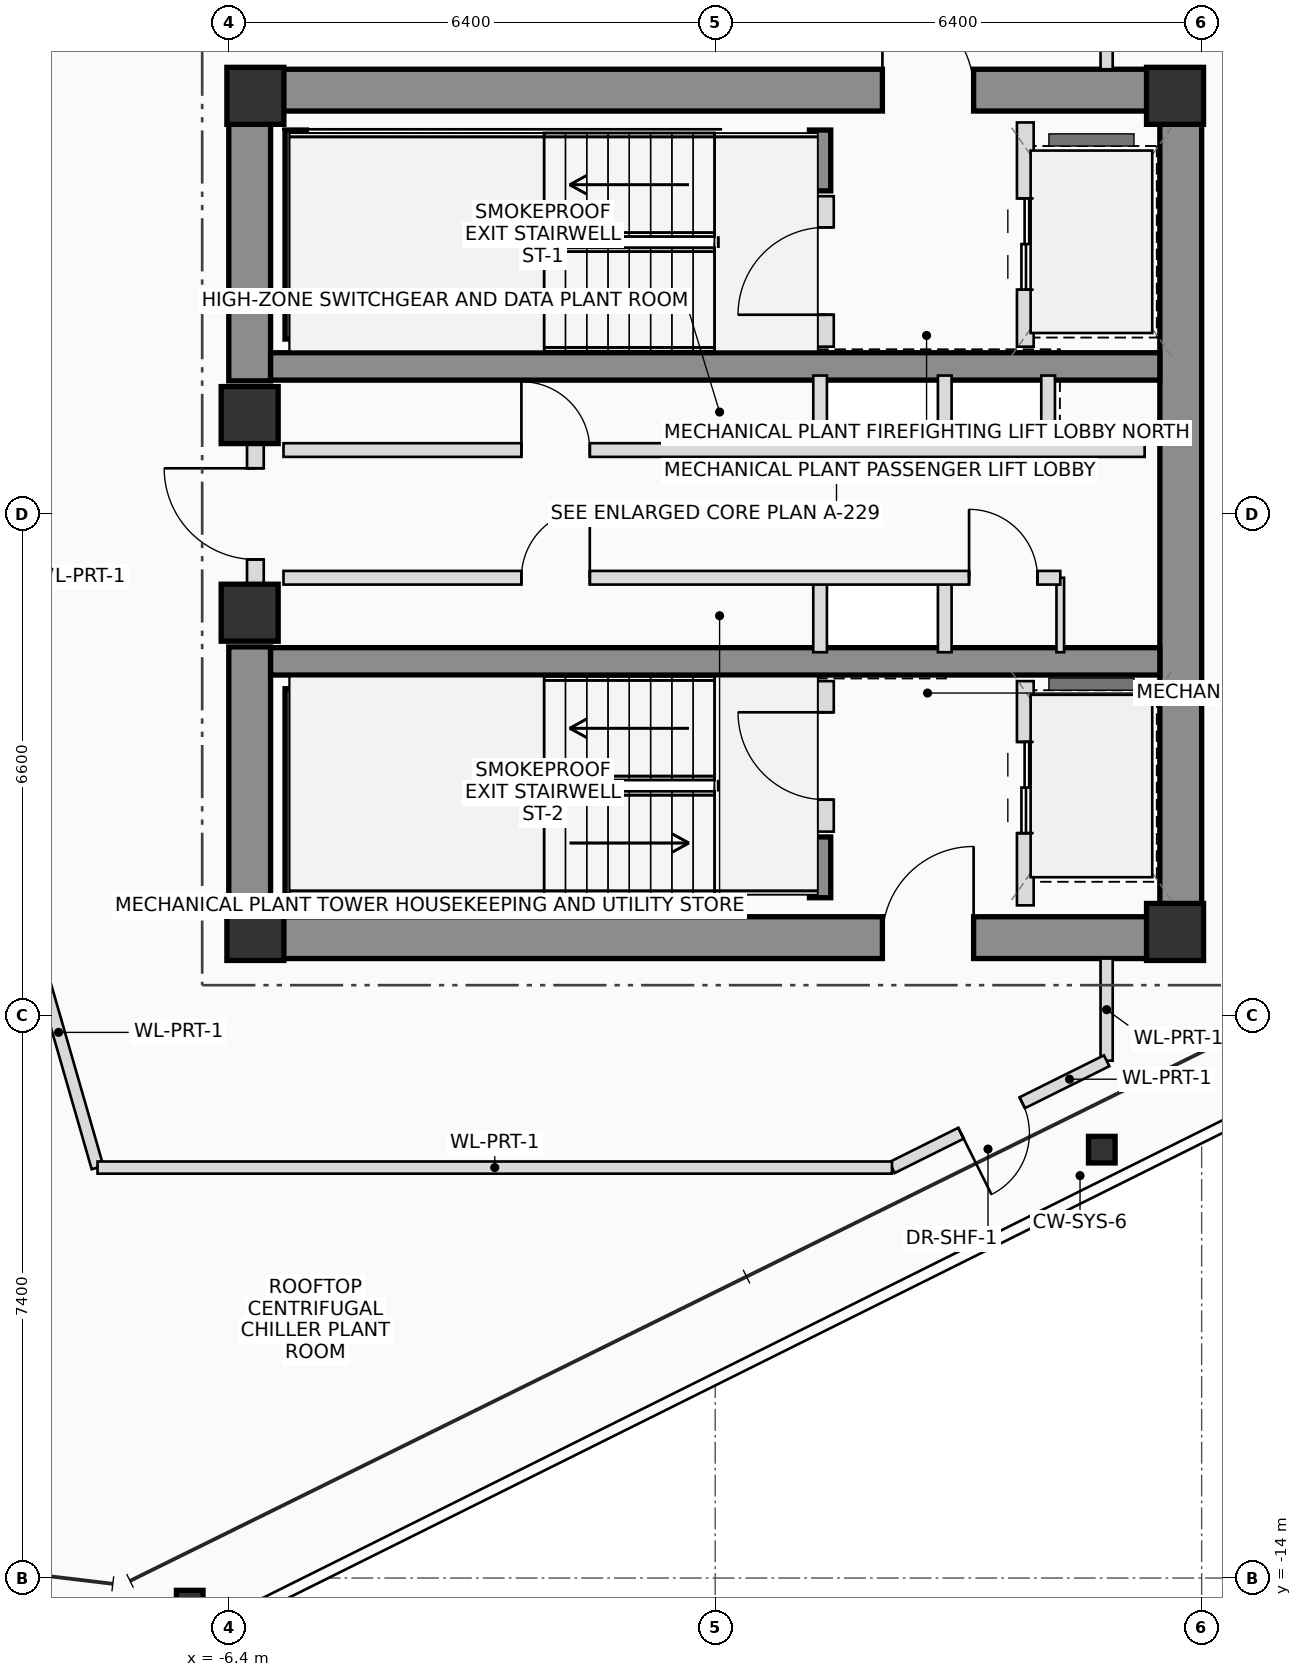
"""IFC4 building model, lengths in metres.
Left out: names, types, materials, properties, quantities, classifications, styles, units other than length and angle.
Written with IfcOpenShell. Run it as: python <this file> out.ifc"""

import sys

from ifc_helpers import new_model, si_unit, direction, frame, frame_2d, origin, origin_2d, place, context, subcontext, project, spatial, rectangle, i_section, extrude, source, transform, mapped, element, fill, save


model = new_model("IFC4")
c1 = context("Model", 3, precision=1e-05, world=origin(), true_north=direction((0.0, 1.0)))
c2 = subcontext(c1, "Body", "Model", "MODEL_VIEW")
j1 = project(units=[si_unit("LENGTHUNIT", "METRE"), si_unit("PLANEANGLEUNIT", "RADIAN")], contexts=[c1])
p1 = place(None, origin())
s1 = spatial("IfcSite", under=j1, at=p1, CompositionType="ELEMENT")
p2 = place(p1, origin())
s2 = spatial("IfcBuilding", under=s1, at=p2, CompositionType="ELEMENT")
p3 = place(p2, frame((0.0, 0.0, 317.45)))
s3 = spatial("IfcBuildingStorey", under=s2, at=p3, CompositionType="ELEMENT", Elevation=317.45)
m1 = source(origin(), c2, "Body", "SweptSolid", [
    extrude(rectangle(XDim=0.75, YDim=0.75, at=origin_2d()), origin(), (0.0, 0.0, 1.0), 5.4),
])
for number, where, z_axis, x_axis in (
    (1, (-6.05, -5.5, 0.0), (0.0, 0.0, 1.0), (1.0, 0.0, 0.0)),
    (2, (6.05, -5.5, 0.0), (0.0, 0.0, 1.0), (1.0, 0.0, 0.0)),
    (3, (6.05, 5.5, 0.0), (0.0, 0.0, 1.0), (1.0, 0.0, 0.0)),
    (4, (-6.05, 5.5, 0.0), (0.0, 0.0, 1.0), (1.0, 0.0, 0.0)),
):
    element("IfcColumn", number, at=place(p3, frame(where, z_axis=z_axis, x_axis=x_axis)), inside=s3, PredefinedType="COLUMN", context=c2, shape_type="MappedRepresentation", body=[
        mapped(m1, transform((0.0, 0.0, 0.0), scale=1.0)),
    ])
p4 = place(p3, frame((-6.4, 5.575, 0.0), z_axis=(0.0, 0.0, 1.0), x_axis=(1.0, 0.0, 0.0)))
e5 = element("IfcWall", 5, at=p4, inside=s3, PredefinedType="SHEAR", context=c2, shape_type="SweptSolid", body=[
    extrude(rectangle(XDim=12.8, YDim=0.55, at=frame_2d((6.4, 0.0))), origin(), (0.0, 0.0, 1.0), 5.4),
])
p5 = place(p4, frame((8.6, 0.0, 0.0)))
e6 = element("IfcOpeningElement", 6, at=p5, cuts=e5, PredefinedType="OPENING", context=c2, shape_type="SweptSolid", body=[
    extrude(rectangle(XDim=1.2, YDim=2.2, at=frame_2d((0.6, 1.1))), frame((0.0, 0.285, 0.0), z_axis=(0.0, -1.0, 0.0), x_axis=(1.0, 0.0, 0.0)), (0.0, 0.0, 1.0), 0.57),
])
p6 = place(p3, frame((-6.4, -5.575, 0.0), z_axis=(0.0, 0.0, 1.0), x_axis=(1.0, 0.0, 0.0)))
e7 = element("IfcWall", 7, at=p6, inside=s3, PredefinedType="SHEAR", context=c2, shape_type="SweptSolid", body=[
    extrude(rectangle(XDim=12.8, YDim=0.55, at=frame_2d((6.4, 0.0))), origin(), (0.0, 0.0, 1.0), 5.4),
])
p7 = place(p6, frame((8.6, 0.0, 0.0)))
e8 = element("IfcOpeningElement", 8, at=p7, cuts=e7, PredefinedType="OPENING", context=c2, shape_type="SweptSolid", body=[
    extrude(rectangle(XDim=1.2, YDim=2.2, at=frame_2d((0.6, 1.1))), frame((0.0, 0.285, 0.0), z_axis=(0.0, -1.0, 0.0), x_axis=(1.0, 0.0, 0.0)), (0.0, 0.0, 1.0), 0.57),
])
p8 = place(p3, frame((6.125, -5.3, 0.0), z_axis=(0.0, 0.0, 1.0), x_axis=(0.0, 1.0, 0.0)))
e9 = element("IfcWall", 9, at=p8, inside=s3, PredefinedType="SHEAR", context=c2, shape_type="SweptSolid", body=[
    extrude(rectangle(XDim=10.6, YDim=0.55, at=frame_2d((5.3, 0.0))), origin(), (0.0, 0.0, 1.0), 5.4),
])
for number, where, z_axis, x_axis in (
    (10, (-6.125, -5.3, 0.0), (0.0, 0.0, 1.0), (0.0, 1.0, 0.0)),
    (11, (-6.125, 1.75, 0.0), (0.0, 0.0, 1.0), (0.0, 1.0, 0.0)),
):
    element("IfcWall", number, at=place(p3, frame(where, z_axis=z_axis, x_axis=x_axis)), inside=s3, PredefinedType="SHEAR", context=c2, shape_type="SweptSolid", body=[
        extrude(rectangle(XDim=3.55, YDim=0.55, at=frame_2d((1.775, 0.0))), origin(), (0.0, 0.0, 1.0), 5.4),
    ])
for number, where, z_axis, x_axis in (
    (12, (-5.85, 1.94, 0.0), (0.0, 0.0, 1.0), (1.0, 0.0, 0.0)),
    (13, (-5.85, -1.94, 0.0), (0.0, 0.0, 1.0), (1.0, 0.0, 0.0)),
):
    element("IfcWall", number, at=place(p3, frame(where, z_axis=z_axis, x_axis=x_axis)), inside=s3, PredefinedType="SHEAR", context=c2, shape_type="SweptSolid", body=[
        extrude(rectangle(XDim=11.7, YDim=0.36, at=frame_2d((5.85, 0.0))), origin(), (0.0, 0.0, 1.0), 5.4),
    ])
p9 = place(p3, frame((-5.52, 2.3, 0.0), z_axis=(0.0, 0.0, 1.0), x_axis=(0.0, 1.0, 0.0)))
e14 = element("IfcWall", 14, at=p9, inside=s3, PredefinedType="SHEAR", context=c2, shape_type="SweptSolid", body=[
    extrude(rectangle(XDim=2.75, YDim=0.28, at=frame_2d((1.375, 0.0))), origin(), (0.0, 0.0, 1.0), 5.4),
])
p10 = place(p3, frame((1.38, 4.25, 0.0), z_axis=(0.0, 0.0, 1.0), x_axis=(0.0, 1.0, 0.0)))
e15 = element("IfcWall", 15, at=p10, inside=s3, PredefinedType="SHEAR", context=c2, shape_type="SweptSolid", body=[
    extrude(rectangle(XDim=0.8, YDim=0.28, at=frame_2d((0.4, 0.0))), origin(), (0.0, 0.0, 1.0), 5.4),
])
p11 = place(p3, frame((-5.52, -5.05, 0.0), z_axis=(0.0, 0.0, 1.0), x_axis=(0.0, 1.0, 0.0)))
e16 = element("IfcWall", 16, at=p11, inside=s3, PredefinedType="SHEAR", context=c2, shape_type="SweptSolid", body=[
    extrude(rectangle(XDim=2.75, YDim=0.28, at=frame_2d((1.375, 0.0))), origin(), (0.0, 0.0, 1.0), 5.4),
])
p12 = place(p3, frame((1.38, -5.05, 0.0), z_axis=(0.0, 0.0, 1.0), x_axis=(0.0, 1.0, 0.0)))
e17 = element("IfcWall", 17, at=p12, inside=s3, PredefinedType="SHEAR", context=c2, shape_type="SweptSolid", body=[
    extrude(rectangle(XDim=0.8, YDim=0.28, at=frame_2d((0.4, 0.0))), origin(), (0.0, 0.0, 1.0), 5.4),
])
for number, where, z_axis, x_axis in (
    (18, (-6.125, -1.3, 0.0), (0.0, 0.0, 1.0), (1.0, 0.0, 0.0)),
    (19, (-6.125, 1.3, 0.0), (0.0, 0.0, 1.0), (1.0, 0.0, 0.0)),
):
    element("IfcColumn", number, at=place(p3, frame(where, z_axis=z_axis, x_axis=x_axis)), inside=s3, PredefinedType="COLUMN", context=c2, shape_type="MappedRepresentation", body=[
        mapped(m1, transform((0.0, 0.0, 0.0), scale=1.0)),
    ])
m2 = source(origin(), c2, "Body", "SweptSolid", [
    extrude(i_section(OverallWidth=0.35, OverallDepth=0.35, WebThickness=0.012, FlangeThickness=0.019, FilletRadius=0.016, at=origin_2d()), origin(), (0.0, 0.0, 1.0), 5.4),
])
for number, where, z_axis, x_axis in (
    (20, (-6.914, -14.337, 0.0), (0.0, 0.0, 1.0), (1.0, 0.0, 0.0)),
    (21, (5.086, -8.364, 0.0), (0.0, 0.0, 1.0), (1.0, 0.0, 0.0)),
):
    element("IfcColumn", number, at=place(p3, frame(where, z_axis=z_axis, x_axis=x_axis)), inside=s3, PredefinedType="COLUMN", context=c2, shape_type="MappedRepresentation", body=[
        mapped(m2, transform((0.0, 0.0, 0.0), scale=1.0)),
    ])
p13 = place(p3, frame((-6.05, -0.95, 0.0), z_axis=(0.0, 0.0, 1.0), x_axis=(0.0, 1.0, 0.0)))
e22 = element("IfcWall", 22, at=p13, inside=s3, PredefinedType="PLUMBINGWALL", context=c2, shape_type="SweptSolid", body=[
    extrude(rectangle(XDim=1.9, YDim=0.22, at=frame_2d((0.95, 0.0))), origin(), (0.0, 0.0, 1.0), 4.1),
])
p14 = place(p13, frame((0.35, 0.0, 0.0)))
e23 = element("IfcOpeningElement", 23, at=p14, cuts=e22, PredefinedType="OPENING", context=c2, shape_type="SweptSolid", body=[
    extrude(rectangle(XDim=1.2, YDim=2.2, at=frame_2d((0.6, 1.1))), frame((0.0, 0.12, 0.0), z_axis=(0.0, -1.0, 0.0), x_axis=(1.0, 0.0, 0.0)), (0.0, 0.0, 1.0), 0.24),
])
p15 = place(p3, frame((1.45, 2.2, 0.0), z_axis=(0.0, 0.0, 1.0), x_axis=(0.0, 1.0, 0.0)))
e24 = element("IfcWall", 24, at=p15, inside=s3, PredefinedType="PLUMBINGWALL", context=c2, shape_type="SweptSolid", body=[
    extrude(rectangle(XDim=1.98, YDim=0.22, at=frame_2d((0.99, 0.0))), origin(), (0.0, 0.0, 1.0), 5.12),
])
p16 = place(p15, frame((0.42, 0.0, 0.0)))
e25 = element("IfcOpeningElement", 25, at=p16, cuts=e24, PredefinedType="OPENING", context=c2, shape_type="SweptSolid", body=[
    extrude(rectangle(XDim=1.15, YDim=2.15, at=frame_2d((0.575, 1.075))), frame((0.0, 0.12, 0.0), z_axis=(0.0, -1.0, 0.0), x_axis=(1.0, 0.0, 0.0)), (0.0, 0.0, 1.0), 0.24),
])
p17 = place(p3, frame((4.08, 2.2, 0.0), z_axis=(0.0, 0.0, 1.0), x_axis=(0.0, 1.0, 0.0)))
e26 = element("IfcWall", 26, at=p17, inside=s3, PredefinedType="PLUMBINGWALL", context=c2, shape_type="SweptSolid", body=[
    extrude(rectangle(XDim=2.95, YDim=0.22, at=frame_2d((1.475, 0.0))), origin(), (0.0, 0.0, 1.0), 5.12),
])
p18 = place(p17, frame((0.75, 0.0, 0.0)))
e27 = element("IfcOpeningElement", 27, at=p18, cuts=e26, PredefinedType="OPENING", context=c2, shape_type="SweptSolid", body=[
    extrude(rectangle(XDim=1.2, YDim=2.25, at=frame_2d((0.6, 1.125))), frame((0.0, 0.12, 0.0), z_axis=(0.0, -1.0, 0.0), x_axis=(1.0, 0.0, 0.0)), (0.0, 0.0, 1.0), 0.24),
])
p19 = place(p3, frame((1.45, -4.18, 0.0), z_axis=(0.0, 0.0, 1.0), x_axis=(0.0, 1.0, 0.0)))
e28 = element("IfcWall", 28, at=p19, inside=s3, PredefinedType="PLUMBINGWALL", context=c2, shape_type="SweptSolid", body=[
    extrude(rectangle(XDim=1.98, YDim=0.22, at=frame_2d((0.99, 0.0))), origin(), (0.0, 0.0, 1.0), 5.12),
])
p20 = place(p19, frame((0.42, 0.0, 0.0)))
e29 = element("IfcOpeningElement", 29, at=p20, cuts=e28, PredefinedType="OPENING", context=c2, shape_type="SweptSolid", body=[
    extrude(rectangle(XDim=1.15, YDim=2.15, at=frame_2d((0.575, 1.075))), frame((0.0, 0.12, 0.0), z_axis=(0.0, -1.0, 0.0), x_axis=(1.0, 0.0, 0.0)), (0.0, 0.0, 1.0), 0.24),
])
p21 = place(p3, frame((4.08, -5.15, 0.0), z_axis=(0.0, 0.0, 1.0), x_axis=(0.0, 1.0, 0.0)))
e30 = element("IfcWall", 30, at=p21, inside=s3, PredefinedType="PLUMBINGWALL", context=c2, shape_type="SweptSolid", body=[
    extrude(rectangle(XDim=2.95, YDim=0.22, at=frame_2d((1.475, 0.0))), origin(), (0.0, 0.0, 1.0), 5.12),
])
p22 = place(p21, frame((0.95, 0.0, 0.0)))
e31 = element("IfcOpeningElement", 31, at=p22, cuts=e30, PredefinedType="OPENING", context=c2, shape_type="SweptSolid", body=[
    extrude(rectangle(XDim=1.2, YDim=2.25, at=frame_2d((0.6, 1.125))), frame((0.0, 0.12, 0.0), z_axis=(0.0, -1.0, 0.0), x_axis=(1.0, 0.0, 0.0)), (0.0, 0.0, 1.0), 0.24),
])
for number, where, z_axis, x_axis in (
    (32, (1.38, 0.84, 0.0), (0.0, 0.0, 1.0), (0.0, 1.0, 0.0)),
    (33, (1.38, -1.82, 0.0), (0.0, 0.0, 1.0), (0.0, 1.0, 0.0)),
    (34, (3.02, 0.84, 0.0), (0.0, 0.0, 1.0), (0.0, 1.0, 0.0)),
    (35, (4.38, 0.84, 0.0), (0.0, 0.0, 1.0), (0.0, 1.0, 0.0)),
    (36, (3.02, -1.82, 0.0), (0.0, 0.0, 1.0), (0.0, 1.0, 0.0)),
):
    element("IfcWall", number, at=place(p3, frame(where, z_axis=z_axis, x_axis=x_axis)), inside=s3, PredefinedType="PLUMBINGWALL", context=c2, shape_type="SweptSolid", body=[
        extrude(rectangle(XDim=0.98, YDim=0.18, at=frame_2d((0.49, 0.0))), origin(), (0.0, 0.0, 1.0), 5.12),
    ])
p23 = place(p3, frame((4.54, -1.82, 0.0), z_axis=(0.0, 0.0, 1.0), x_axis=(0.0, 1.0, 0.0)))
e37 = element("IfcWall", 37, at=p23, inside=s3, PredefinedType="PARTITIONING", context=c2, shape_type="SweptSolid", body=[
    extrude(rectangle(XDim=0.98, YDim=0.1, at=frame_2d((0.49, 0.0))), origin(), (0.0, 0.0, 1.0), 5.12),
])
p24 = place(p3, frame((-5.68, 0.84, 0.0), z_axis=(0.0, 0.0, 1.0), x_axis=(1.0, 0.0, 0.0)))
e38 = element("IfcWall", 38, at=p24, inside=s3, PredefinedType="PLUMBINGWALL", context=c2, shape_type="SweptSolid", body=[
    extrude(rectangle(XDim=11.33, YDim=0.18, at=frame_2d((5.665, 0.0))), origin(), (0.0, 0.0, 1.0), 5.12),
])
p25 = place(p24, frame((3.13, 0.0, 0.0)))
e39 = element("IfcOpeningElement", 39, at=p25, cuts=e38, PredefinedType="OPENING", context=c2, shape_type="SweptSolid", body=[
    extrude(rectangle(XDim=0.9, YDim=2.05, at=frame_2d((0.45, 1.025))), frame((0.0, 0.1, 0.0), z_axis=(0.0, -1.0, 0.0), x_axis=(1.0, 0.0, 0.0)), (0.0, 0.0, 1.0), 0.2),
])
p26 = place(p3, frame((-5.68, -0.84, 0.0), z_axis=(0.0, 0.0, 1.0), x_axis=(1.0, 0.0, 0.0)))
e40 = element("IfcWall", 40, at=p26, inside=s3, PredefinedType="PLUMBINGWALL", context=c2, shape_type="SweptSolid", body=[
    extrude(rectangle(XDim=10.22, YDim=0.18, at=frame_2d((5.11, 0.0))), origin(), (0.0, 0.0, 1.0), 5.12),
])
p27 = place(p26, frame((3.13, 0.0, 0.0)))
e41 = element("IfcOpeningElement", 41, at=p27, cuts=e40, PredefinedType="OPENING", context=c2, shape_type="SweptSolid", body=[
    extrude(rectangle(XDim=0.9, YDim=2.05, at=frame_2d((0.45, 1.025))), frame((0.0, 0.1, 0.0), z_axis=(0.0, -1.0, 0.0), x_axis=(1.0, 0.0, 0.0)), (0.0, 0.0, 1.0), 0.2),
])
p28 = place(p26, frame((9.02, 0.0, 0.0)))
e42 = element("IfcOpeningElement", 42, at=p28, cuts=e40, PredefinedType="OPENING", context=c2, shape_type="SweptSolid", body=[
    extrude(rectangle(XDim=0.9, YDim=2.05, at=frame_2d((0.45, 1.025))), frame((0.0, 0.1, 0.0), z_axis=(0.0, -1.0, 0.0), x_axis=(1.0, 0.0, 0.0)), (0.0, 0.0, 1.0), 0.2),
])
p29 = place(p3, frame((-8.127, -8.6, 0.0), z_axis=(0.0, 0.0, 1.0), x_axis=(-0.276340929224, 0.961059670799, 0.0)))
e43 = element("IfcWall", 43, at=p29, inside=s3, PredefinedType="PARTITIONING", context=c2, shape_type="SweptSolid", body=[
    extrude(rectangle(XDim=3.702, YDim=0.16, at=frame_2d((1.851, 0.0))), origin(), (0.0, 0.0, 1.0), 5.12),
])
for number, where, z_axis, x_axis in (
    (44, (5.15, 7.194, 0.0), (0.0, 0.0, 1.0), (0.0, -1.0, 0.0)),
    (45, (5.15, -5.85, 0.0), (0.0, 0.0, 1.0), (0.0, -1.0, 0.0)),
):
    element("IfcWall", number, at=place(p3, frame(where, z_axis=z_axis, x_axis=x_axis)), inside=s3, PredefinedType="PARTITIONING", context=c2, shape_type="SweptSolid", body=[
        extrude(rectangle(XDim=1.344, YDim=0.16, at=frame_2d((0.672, 0.0))), origin(), (0.0, 0.0, 1.0), 5.12),
    ])
p30 = place(p3, frame((5.15, -7.194, 0.0), z_axis=(0.0, 0.0, 1.0), x_axis=(-0.895230583317, -0.445603189725, 0.0)))
e46 = element("IfcWall", 46, at=p30, inside=s3, PredefinedType="PARTITIONING", context=c2, shape_type="SweptSolid", body=[
    extrude(rectangle(XDim=3.155, YDim=0.16, at=frame_2d((1.577, 0.0))), origin(), (0.0, 0.0, 1.0), 5.12),
])
p31 = place(p30, frame((1.24, 0.0, 0.0)))
e47 = element("IfcOpeningElement", 47, at=p31, cuts=e46, PredefinedType="OPENING", context=c2, shape_type="SweptSolid", body=[
    extrude(rectangle(XDim=0.9, YDim=2.05, at=frame_2d((0.45, 1.025))), frame((0.0, 0.09, 0.0), z_axis=(0.0, -1.0, 0.0), x_axis=(1.0, 0.0, 0.0)), (0.0, 0.0, 1.0), 0.18),
])
p32 = place(p3, frame((2.326, -8.6, 0.0), z_axis=(0.0, 0.0, 1.0), x_axis=(-1.0, 0.0, 0.0)))
e48 = element("IfcWall", 48, at=p32, inside=s3, PredefinedType="PARTITIONING", context=c2, shape_type="SweptSolid", body=[
    extrude(rectangle(XDim=10.453, YDim=0.16, at=frame_2d((5.226, 0.0))), origin(), (0.0, 0.0, 1.0), 5.12),
])
p33 = place(p5, origin())
e49 = element("IfcDoor", 49, at=p33, inside=s3, OperationType="SINGLE_SWING_LEFT", PredefinedType="DOOR", context=c2, shape_type="SweptSolid", body=[
    extrude(rectangle(XDim=1.2, YDim=2.2, at=frame_2d((0.6, 1.1))), frame((0.0, 0.025, 0.0), z_axis=(0.0, -1.0, 0.0), x_axis=(1.0, 0.0, 0.0)), (0.0, 0.0, 1.0), 0.05),
])
fill(e6, e49)
p34 = place(p7, origin())
e50 = element("IfcDoor", 50, at=p34, inside=s3, OperationType="SINGLE_SWING_RIGHT", PredefinedType="DOOR", context=c2, shape_type="SweptSolid", body=[
    extrude(rectangle(XDim=1.2, YDim=2.2, at=frame_2d((0.6, 1.1))), frame((0.0, 0.025, 0.0), z_axis=(0.0, -1.0, 0.0), x_axis=(1.0, 0.0, 0.0)), (0.0, 0.0, 1.0), 0.05),
])
fill(e8, e50)
p35 = place(p14, origin())
e51 = element("IfcDoor", 51, at=p35, inside=s3, OperationType="SINGLE_SWING_RIGHT", PredefinedType="DOOR", context=c2, shape_type="SweptSolid", body=[
    extrude(rectangle(XDim=1.2, YDim=2.2, at=frame_2d((0.6, 1.1))), frame((0.0, 0.025, 0.0), z_axis=(0.0, -1.0, 0.0), x_axis=(1.0, 0.0, 0.0)), (0.0, 0.0, 1.0), 0.05),
])
fill(e23, e51)
p36 = place(p16, origin())
e52 = element("IfcDoor", 52, at=p36, inside=s3, OperationType="SINGLE_SWING_LEFT", PredefinedType="DOOR", context=c2, shape_type="SweptSolid", body=[
    extrude(rectangle(XDim=1.15, YDim=2.15, at=frame_2d((0.575, 1.075))), frame((0.0, 0.025, 0.0), z_axis=(0.0, -1.0, 0.0), x_axis=(1.0, 0.0, 0.0)), (0.0, 0.0, 1.0), 0.05),
])
fill(e25, e52)
p37 = place(p18, origin())
e53 = element("IfcDoor", 53, at=p37, inside=s3, OperationType="DOUBLE_DOOR_SLIDING", PredefinedType="DOOR", context=c2, shape_type="SweptSolid", body=[
    extrude(rectangle(XDim=1.2, YDim=2.25, at=frame_2d((0.6, 1.125))), frame((0.0, 0.025, 0.0), z_axis=(0.0, -1.0, 0.0), x_axis=(1.0, 0.0, 0.0)), (0.0, 0.0, 1.0), 0.05),
])
fill(e27, e53)
p38 = place(p20, origin())
e54 = element("IfcDoor", 54, at=p38, inside=s3, OperationType="SINGLE_SWING_RIGHT", PredefinedType="DOOR", context=c2, shape_type="SweptSolid", body=[
    extrude(rectangle(XDim=1.15, YDim=2.15, at=frame_2d((0.575, 1.075))), frame((0.0, 0.025, 0.0), z_axis=(0.0, -1.0, 0.0), x_axis=(1.0, 0.0, 0.0)), (0.0, 0.0, 1.0), 0.05),
])
fill(e29, e54)
p39 = place(p22, origin())
e55 = element("IfcDoor", 55, at=p39, inside=s3, OperationType="DOUBLE_DOOR_SLIDING", PredefinedType="DOOR", context=c2, shape_type="SweptSolid", body=[
    extrude(rectangle(XDim=1.2, YDim=2.25, at=frame_2d((0.6, 1.125))), frame((0.0, 0.025, 0.0), z_axis=(0.0, -1.0, 0.0), x_axis=(1.0, 0.0, 0.0)), (0.0, 0.0, 1.0), 0.05),
])
fill(e31, e55)
p40 = place(p25, origin())
e56 = element("IfcDoor", 56, at=p40, inside=s3, OperationType="SINGLE_SWING_LEFT", PredefinedType="DOOR", context=c2, shape_type="SweptSolid", body=[
    extrude(rectangle(XDim=0.9, YDim=2.05, at=frame_2d((0.45, 1.025))), frame((0.0, 0.025, 0.0), z_axis=(0.0, -1.0, 0.0), x_axis=(1.0, 0.0, 0.0)), (0.0, 0.0, 1.0), 0.05),
])
fill(e39, e56)
p41 = place(p27, origin())
e57 = element("IfcDoor", 57, at=p41, inside=s3, OperationType="SINGLE_SWING_RIGHT", PredefinedType="DOOR", context=c2, shape_type="SweptSolid", body=[
    extrude(rectangle(XDim=0.9, YDim=2.05, at=frame_2d((0.45, 1.025))), frame((0.0, 0.025, 0.0), z_axis=(0.0, -1.0, 0.0), x_axis=(1.0, 0.0, 0.0)), (0.0, 0.0, 1.0), 0.05),
])
fill(e41, e57)
p42 = place(p28, origin())
e58 = element("IfcDoor", 58, at=p42, inside=s3, OperationType="SINGLE_SWING_LEFT", PredefinedType="DOOR", context=c2, shape_type="SweptSolid", body=[
    extrude(rectangle(XDim=0.9, YDim=2.05, at=frame_2d((0.45, 1.025))), frame((0.0, 0.025, 0.0), z_axis=(0.0, -1.0, 0.0), x_axis=(1.0, 0.0, 0.0)), (0.0, 0.0, 1.0), 0.05),
])
fill(e42, e58)
p43 = place(p31, origin())
e59 = element("IfcDoor", 59, at=p43, inside=s3, OperationType="SINGLE_SWING_RIGHT", PredefinedType="DOOR", context=c2, shape_type="SweptSolid", body=[
    extrude(rectangle(XDim=0.9, YDim=2.05, at=frame_2d((0.45, 1.025))), frame((0.0, 0.025, 0.0), z_axis=(0.0, -1.0, 0.0), x_axis=(1.0, 0.0, 0.0)), (0.0, 0.0, 1.0), 0.05),
])
fill(e47, e59)
save(model, sys.argv[1])
